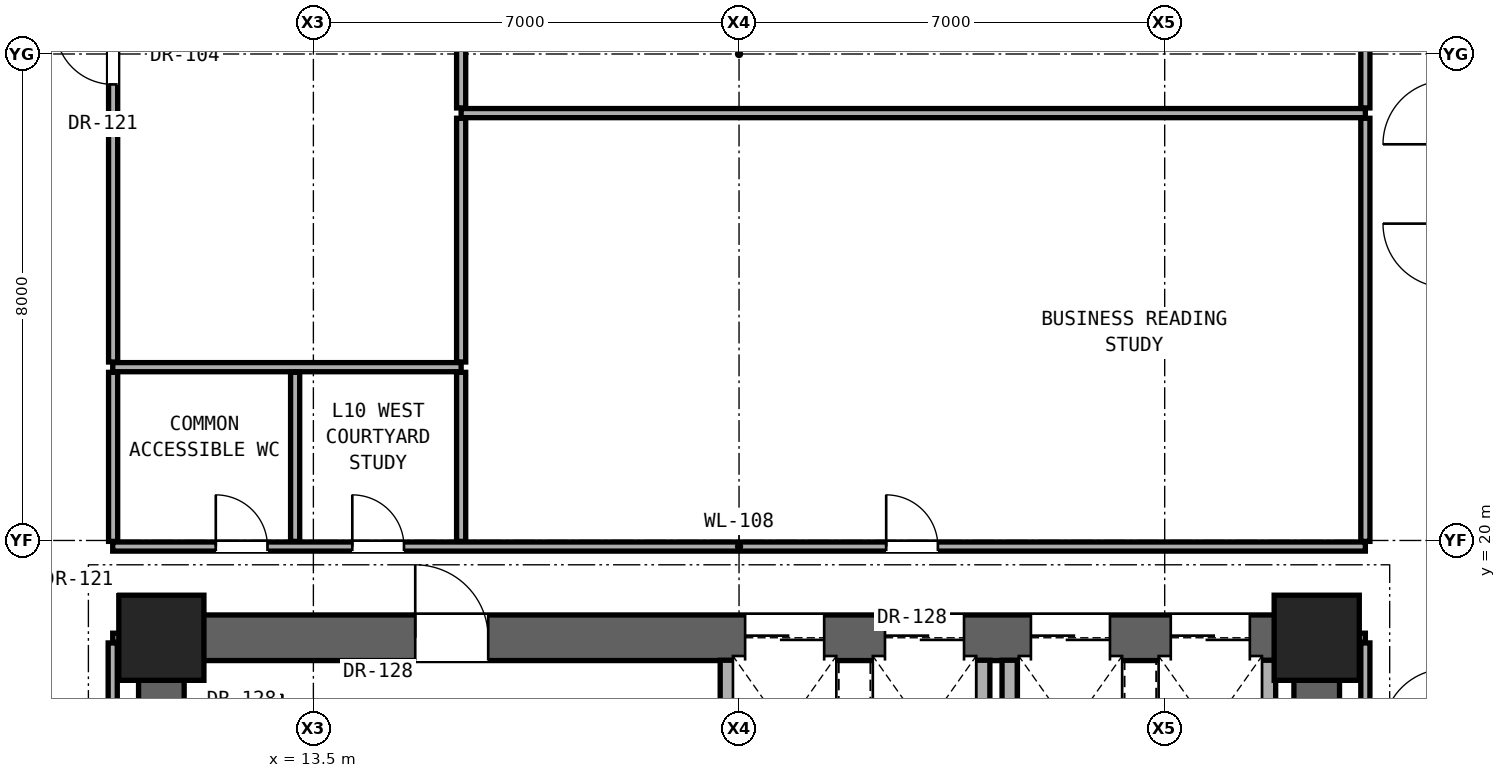
"""IFC4 building model, lengths in metres.
Left out: names, types, materials, properties, quantities, classifications, styles, units other than length and angle.
Written with IfcOpenShell. Run it as: python <this file> out.ifc"""

import sys

from ifc_helpers import new_model, si_unit, direction, frame, frame_2d, origin, origin_2d, place, context, subcontext, project, spatial, rectangle, extrude, element, fill, save


model = new_model("IFC4")
c1 = context("Model", 3, precision=1e-05, world=origin(), true_north=direction((0.0, 1.0)))
c2 = subcontext(c1, "Body", "Model", "MODEL_VIEW")
j1 = project(units=[si_unit("LENGTHUNIT", "METRE"), si_unit("PLANEANGLEUNIT", "RADIAN")], contexts=[c1])
p1 = place(None, origin())
s1 = spatial("IfcSite", under=j1, at=p1, CompositionType="ELEMENT")
p2 = place(p1, origin())
s2 = spatial("IfcBuilding", under=s1, at=p2, CompositionType="ELEMENT")
p3 = place(p2, frame((0.0, 0.0, 38.9)))
s3 = spatial("IfcBuildingStorey", under=s2, at=p3, CompositionType="ELEMENT", Elevation=38.9)
for number, where, z_axis, x_axis in (
    (1, (11.0, 18.4, 0.0), (0.0, 0.0, 1.0), (1.0, 0.0, 0.0)),
    (2, (30.0, 18.4, 0.0), (0.0, 0.0, 1.0), (1.0, 0.0, 0.0)),
):
    element("IfcColumn", number, at=place(p3, frame(where, z_axis=z_axis, x_axis=x_axis)), inside=s3, PredefinedType="COLUMN", context=c2, shape_type="SweptSolid", body=[
        extrude(rectangle(XDim=1.4, YDim=1.4, at=origin_2d()), origin(), (0.0, 0.0, 1.0), 3.3),
    ])
for number, where, z_axis, x_axis in (
    (3, (11.0, 12.4, 0.0), (0.0, 0.0, 1.0), (0.0, 1.0, 0.0)),
    (4, (30.0, 12.4, 0.0), (0.0, 0.0, 1.0), (0.0, 1.0, 0.0)),
):
    element("IfcWall", number, at=place(p3, frame(where, z_axis=z_axis, x_axis=x_axis)), inside=s3, PredefinedType="SHEAR", context=c2, shape_type="SweptSolid", body=[
        extrude(rectangle(XDim=6.0, YDim=0.75, at=frame_2d((3.0, 0.0))), origin(), (0.0, 0.0, 1.0), 3.06),
    ])
p4 = place(p3, frame((11.0, 18.4, 0.0), z_axis=(0.0, 0.0, 1.0), x_axis=(1.0, 0.0, 0.0)))
e5 = element("IfcWall", 5, at=p4, inside=s3, PredefinedType="SHEAR", context=c2, shape_type="SweptSolid", body=[
    extrude(rectangle(XDim=19.0, YDim=0.75, at=frame_2d((9.5, 0.0))), origin(), (0.0, 0.0, 1.0), 3.06),
])
p5 = place(p4, frame((4.175, 0.0, 0.0)))
e6 = element("IfcOpeningElement", 6, at=p5, cuts=e5, PredefinedType="OPENING", context=c2, shape_type="SweptSolid", body=[
    extrude(rectangle(XDim=1.2, YDim=2.25, at=frame_2d((0.6, 1.125))), frame((0.0, 0.385, 0.0), z_axis=(0.0, -1.0, 0.0), x_axis=(1.0, 0.0, 0.0)), (0.0, 0.0, 1.0), 0.77),
])
p6 = place(p4, frame((9.6, 0.0, 0.0)))
e7 = element("IfcOpeningElement", 7, at=p6, cuts=e5, PredefinedType="OPENING", context=c2, shape_type="SweptSolid", body=[
    extrude(rectangle(XDim=1.3, YDim=2.3, at=frame_2d((0.65, 1.15))), frame((0.0, 0.385, 0.0), z_axis=(0.0, -1.0, 0.0), x_axis=(1.0, 0.0, 0.0)), (0.0, 0.0, 1.0), 0.77),
])
p7 = place(p4, frame((11.9, 0.0, 0.0)))
e8 = element("IfcOpeningElement", 8, at=p7, cuts=e5, PredefinedType="OPENING", context=c2, shape_type="SweptSolid", body=[
    extrude(rectangle(XDim=1.3, YDim=2.3, at=frame_2d((0.65, 1.15))), frame((0.0, 0.385, 0.0), z_axis=(0.0, -1.0, 0.0), x_axis=(1.0, 0.0, 0.0)), (0.0, 0.0, 1.0), 0.77),
])
p8 = place(p4, frame((14.3, 0.0, 0.0)))
e9 = element("IfcOpeningElement", 9, at=p8, cuts=e5, PredefinedType="OPENING", context=c2, shape_type="SweptSolid", body=[
    extrude(rectangle(XDim=1.3, YDim=2.3, at=frame_2d((0.65, 1.15))), frame((0.0, 0.385, 0.0), z_axis=(0.0, -1.0, 0.0), x_axis=(1.0, 0.0, 0.0)), (0.0, 0.0, 1.0), 0.77),
])
p9 = place(p4, frame((16.6, 0.0, 0.0)))
e10 = element("IfcOpeningElement", 10, at=p9, cuts=e5, PredefinedType="OPENING", context=c2, shape_type="SweptSolid", body=[
    extrude(rectangle(XDim=1.3, YDim=2.3, at=frame_2d((0.65, 1.15))), frame((0.0, 0.385, 0.0), z_axis=(0.0, -1.0, 0.0), x_axis=(1.0, 0.0, 0.0)), (0.0, 0.0, 1.0), 0.77),
])
for number, where, z_axis, x_axis in (
    (11, (10.2, 18.4, 0.0), (0.0, 0.0, 1.0), (1.0, 0.0, 0.0)),
    (12, (30.37, 18.4, 0.0), (0.0, 0.0, 1.0), (1.0, 0.0, 0.0)),
):
    element("IfcWall", number, at=place(p3, frame(where, z_axis=z_axis, x_axis=x_axis)), inside=s3, PredefinedType="PARTITIONING", context=c2, shape_type="SweptSolid", body=[
        extrude(rectangle(XDim=0.43, YDim=0.15, at=frame_2d((0.215, 0.0))), origin(), (0.0, 0.0, 1.0), 2.436),
    ])
p10 = place(p3, frame((10.2, 19.9, 0.0), z_axis=(0.0, 0.0, 1.0), x_axis=(1.0, 0.0, 0.0)))
e13 = element("IfcWall", 13, at=p10, inside=s3, PredefinedType="PARTITIONING", context=c2, shape_type="SweptSolid", body=[
    extrude(rectangle(XDim=20.6, YDim=0.15, at=frame_2d((10.3, 0.0))), origin(), (0.0, 0.0, 1.0), 2.104),
])
p11 = place(p10, frame((1.695, 0.0, 0.0)))
e14 = element("IfcOpeningElement", 14, at=p11, cuts=e13, PredefinedType="OPENING", context=c2, shape_type="SweptSolid", body=[
    extrude(rectangle(XDim=0.85, YDim=2.01, at=frame_2d((0.425, 1.005))), frame((0.0, 0.085, 0.0), z_axis=(0.0, -1.0, 0.0), x_axis=(1.0, 0.0, 0.0)), (0.0, 0.0, 1.0), 0.17),
])
p12 = place(p10, frame((3.94, 0.0, 0.0)))
e15 = element("IfcOpeningElement", 15, at=p12, cuts=e13, PredefinedType="OPENING", context=c2, shape_type="SweptSolid", body=[
    extrude(rectangle(XDim=0.85, YDim=2.01, at=frame_2d((0.425, 1.005))), frame((0.0, 0.085, 0.0), z_axis=(0.0, -1.0, 0.0), x_axis=(1.0, 0.0, 0.0)), (0.0, 0.0, 1.0), 0.17),
])
p13 = place(p10, frame((12.72, 0.0, 0.0)))
e16 = element("IfcOpeningElement", 16, at=p13, cuts=e13, PredefinedType="OPENING", context=c2, shape_type="SweptSolid", body=[
    extrude(rectangle(XDim=0.85, YDim=2.01, at=frame_2d((0.425, 1.005))), frame((0.0, 0.085, 0.0), z_axis=(0.0, -1.0, 0.0), x_axis=(1.0, 0.0, 0.0)), (0.0, 0.0, 1.0), 0.17),
])
p14 = place(p3, frame((10.2, 22.85, 0.0), z_axis=(0.0, 0.0, 1.0), x_axis=(1.0, 0.0, 0.0)))
e17 = element("IfcWall", 17, at=p14, inside=s3, PredefinedType="PARTITIONING", context=c2, shape_type="SweptSolid", body=[
    extrude(rectangle(XDim=5.73, YDim=0.15, at=frame_2d((2.865, 0.0))), origin(), (0.0, 0.0, 1.0), 2.104),
])
p15 = place(p3, frame((15.93, 27.028, 0.0), z_axis=(0.0, 0.0, 1.0), x_axis=(1.0, 0.0, 0.0)))
e18 = element("IfcWall", 18, at=p15, inside=s3, PredefinedType="PARTITIONING", context=c2, shape_type="SweptSolid", body=[
    extrude(rectangle(XDim=14.87, YDim=0.15, at=frame_2d((7.435, 0.0))), origin(), (0.0, 0.0, 1.0), 2.104),
])
p16 = place(p3, frame((10.2, 12.335, 0.0), z_axis=(0.0, 0.0, 1.0), x_axis=(0.0, 1.0, 0.0)))
e19 = element("IfcWall", 19, at=p16, inside=s3, PredefinedType="PARTITIONING", context=c2, shape_type="SweptSolid", body=[
    extrude(rectangle(XDim=5.98, YDim=0.15, at=frame_2d((2.99, 0.0))), origin(), (0.0, 0.0, 1.0), 2.436),
])
p17 = place(p3, frame((10.207, 19.985, 0.0), z_axis=(0.0, 0.0, 1.0), x_axis=(0.0, 1.0, 0.0)))
e20 = element("IfcWall", 20, at=p17, inside=s3, PredefinedType="PARTITIONING", context=c2, shape_type="SweptSolid", body=[
    extrude(rectangle(XDim=2.78, YDim=0.15, at=frame_2d((1.39, 0.0))), origin(), (0.0, 0.0, 1.0), 3.06),
])
p18 = place(p3, frame((10.207, 22.935, 0.0), z_axis=(0.0, 0.0, 1.0), x_axis=(0.0, 1.0, 0.0)))
e21 = element("IfcWall", 21, at=p18, inside=s3, PredefinedType="PARTITIONING", context=c2, shape_type="SweptSolid", body=[
    extrude(rectangle(XDim=10.08, YDim=0.15, at=frame_2d((5.04, 0.0))), origin(), (0.0, 0.0, 1.0), 2.279),
])
p19 = place(p18, frame((4.565, 0.0, 0.0)))
e22 = element("IfcOpeningElement", 22, at=p19, cuts=e21, PredefinedType="OPENING", context=c2, shape_type="SweptSolid", body=[
    extrude(rectangle(XDim=0.95, YDim=2.15, at=frame_2d((0.475, 1.075))), frame((0.0, 0.085, 0.0), z_axis=(0.0, -1.0, 0.0), x_axis=(1.0, 0.0, 0.0)), (0.0, 0.0, 1.0), 0.17),
])
p20 = place(p3, frame((13.2, 19.985, 0.0), z_axis=(0.0, 0.0, 1.0), x_axis=(0.0, 1.0, 0.0)))
e23 = element("IfcWall", 23, at=p20, inside=s3, PredefinedType="PARTITIONING", context=c2, shape_type="SweptSolid", body=[
    extrude(rectangle(XDim=2.78, YDim=0.15, at=frame_2d((1.39, 0.0))), origin(), (0.0, 0.0, 1.0), 3.06),
])
p21 = place(p3, frame((15.93, 19.985, 0.0), z_axis=(0.0, 0.0, 1.0), x_axis=(0.0, 1.0, 0.0)))
e24 = element("IfcWall", 24, at=p21, inside=s3, PredefinedType="PARTITIONING", context=c2, shape_type="SweptSolid", body=[
    extrude(rectangle(XDim=2.78, YDim=0.15, at=frame_2d((1.39, 0.0))), origin(), (0.0, 0.0, 1.0), 2.589),
])
p22 = place(p3, frame((15.93, 22.935, 0.0), z_axis=(0.0, 0.0, 1.0), x_axis=(0.0, 1.0, 0.0)))
e25 = element("IfcWall", 25, at=p22, inside=s3, PredefinedType="PARTITIONING", context=c2, shape_type="SweptSolid", body=[
    extrude(rectangle(XDim=4.008, YDim=0.15, at=frame_2d((2.004, 0.0))), origin(), (0.0, 0.0, 1.0), 2.104),
])
p23 = place(p3, frame((15.93, 27.113, 0.0), z_axis=(0.0, 0.0, 1.0), x_axis=(0.0, 1.0, 0.0)))
e26 = element("IfcWall", 26, at=p23, inside=s3, PredefinedType="PARTITIONING", context=c2, shape_type="SweptSolid", body=[
    extrude(rectangle(XDim=5.902, YDim=0.15, at=frame_2d((2.951, 0.0))), origin(), (0.0, 0.0, 1.0), 2.104),
])
p24 = place(p3, frame((20.315, 16.555, 0.0), z_axis=(0.0, 0.0, 1.0), x_axis=(0.0, 1.0, 0.0)))
e27 = element("IfcWall", 27, at=p24, inside=s3, PredefinedType="SOLIDWALL", context=c2, shape_type="SweptSolid", body=[
    extrude(rectangle(XDim=1.475, YDim=0.25, at=frame_2d((0.738, 0.0))), origin(), (0.0, 0.0, 1.0), 3.06),
])
for number, where, z_axis, x_axis in (
    (28, (24.5, 15.785, 0.0), (0.0, 0.0, 1.0), (0.0, 1.0, 0.0)),
    (29, (24.95, 15.785, 0.0), (0.0, 0.0, 1.0), (0.0, 1.0, 0.0)),
    (30, (29.2, 15.785, 0.0), (0.0, 0.0, 1.0), (0.0, 1.0, 0.0)),
):
    element("IfcWall", number, at=place(p3, frame(where, z_axis=z_axis, x_axis=x_axis)), inside=s3, PredefinedType="SOLIDWALL", context=c2, shape_type="SweptSolid", body=[
        extrude(rectangle(XDim=2.245, YDim=0.25, at=frame_2d((1.123, 0.0))), origin(), (0.0, 0.0, 1.0), 3.06),
    ])
p25 = place(p3, frame((30.8, 12.335, 0.0), z_axis=(0.0, 0.0, 1.0), x_axis=(0.0, 1.0, 0.0)))
e31 = element("IfcWall", 31, at=p25, inside=s3, PredefinedType="PARTITIONING", context=c2, shape_type="SweptSolid", body=[
    extrude(rectangle(XDim=5.98, YDim=0.15, at=frame_2d((2.99, 0.0))), origin(), (0.0, 0.0, 1.0), 2.436),
])
p26 = place(p3, frame((30.8, 19.985, 0.0), z_axis=(0.0, 0.0, 1.0), x_axis=(0.0, 1.0, 0.0)))
e32 = element("IfcWall", 32, at=p26, inside=s3, PredefinedType="PARTITIONING", context=c2, shape_type="SweptSolid", body=[
    extrude(rectangle(XDim=6.958, YDim=0.15, at=frame_2d((3.479, 0.0))), origin(), (0.0, 0.0, 1.0), 2.279),
])
p27 = place(p3, frame((30.8, 27.113, 0.0), z_axis=(0.0, 0.0, 1.0), x_axis=(0.0, 1.0, 0.0)))
e33 = element("IfcWall", 33, at=p27, inside=s3, PredefinedType="PARTITIONING", context=c2, shape_type="SweptSolid", body=[
    extrude(rectangle(XDim=5.902, YDim=0.15, at=frame_2d((2.951, 0.0))), origin(), (0.0, 0.0, 1.0), 2.279),
])
p28 = place(p5, origin())
e34 = element("IfcDoor", 34, at=p28, inside=s3, OperationType="SINGLE_SWING_LEFT", PredefinedType="DOOR", context=c2, shape_type="SweptSolid", body=[
    extrude(rectangle(XDim=1.2, YDim=2.25, at=frame_2d((0.6, 1.125))), frame((0.0, 0.025, 0.0), z_axis=(0.0, -1.0, 0.0), x_axis=(1.0, 0.0, 0.0)), (0.0, 0.0, 1.0), 0.05),
])
fill(e6, e34)
p29 = place(p11, origin())
e35 = element("IfcDoor", 35, at=p29, inside=s3, OperationType="SINGLE_SWING_LEFT", PredefinedType="DOOR", context=c2, shape_type="SweptSolid", body=[
    extrude(rectangle(XDim=0.85, YDim=2.01, at=frame_2d((0.425, 1.005))), frame((0.0, 0.025, 0.0), z_axis=(0.0, -1.0, 0.0), x_axis=(1.0, 0.0, 0.0)), (0.0, 0.0, 1.0), 0.05),
])
fill(e14, e35)
p30 = place(p12, origin())
e36 = element("IfcDoor", 36, at=p30, inside=s3, OperationType="SINGLE_SWING_LEFT", PredefinedType="DOOR", context=c2, shape_type="SweptSolid", body=[
    extrude(rectangle(XDim=0.85, YDim=2.01, at=frame_2d((0.425, 1.005))), frame((0.0, 0.025, 0.0), z_axis=(0.0, -1.0, 0.0), x_axis=(1.0, 0.0, 0.0)), (0.0, 0.0, 1.0), 0.05),
])
fill(e15, e36)
p31 = place(p19, origin())
e37 = element("IfcDoor", 37, at=p31, inside=s3, OperationType="SINGLE_SWING_RIGHT", PredefinedType="DOOR", context=c2, shape_type="SweptSolid", body=[
    extrude(rectangle(XDim=0.95, YDim=2.15, at=frame_2d((0.475, 1.075))), frame((0.0, 0.025, 0.0), z_axis=(0.0, -1.0, 0.0), x_axis=(1.0, 0.0, 0.0)), (0.0, 0.0, 1.0), 0.05),
])
fill(e22, e37)
p32 = place(p13, origin())
e38 = element("IfcDoor", 38, at=p32, inside=s3, OperationType="SINGLE_SWING_LEFT", PredefinedType="DOOR", context=c2, shape_type="SweptSolid", body=[
    extrude(rectangle(XDim=0.85, YDim=2.01, at=frame_2d((0.425, 1.005))), frame((0.0, 0.025, 0.0), z_axis=(0.0, -1.0, 0.0), x_axis=(1.0, 0.0, 0.0)), (0.0, 0.0, 1.0), 0.05),
])
fill(e16, e38)
p33 = place(p6, origin())
e39 = element("IfcDoor", 39, at=p33, inside=s3, OperationType="DOUBLE_DOOR_SLIDING", PredefinedType="DOOR", context=c2, shape_type="SweptSolid", body=[
    extrude(rectangle(XDim=1.3, YDim=2.3, at=frame_2d((0.65, 1.15))), frame((0.0, 0.025, 0.0), z_axis=(0.0, -1.0, 0.0), x_axis=(1.0, 0.0, 0.0)), (0.0, 0.0, 1.0), 0.05),
])
fill(e7, e39)
p34 = place(p7, origin())
e40 = element("IfcDoor", 40, at=p34, inside=s3, OperationType="DOUBLE_DOOR_SLIDING", PredefinedType="DOOR", context=c2, shape_type="SweptSolid", body=[
    extrude(rectangle(XDim=1.3, YDim=2.3, at=frame_2d((0.65, 1.15))), frame((0.0, 0.025, 0.0), z_axis=(0.0, -1.0, 0.0), x_axis=(1.0, 0.0, 0.0)), (0.0, 0.0, 1.0), 0.05),
])
fill(e8, e40)
p35 = place(p8, origin())
e41 = element("IfcDoor", 41, at=p35, inside=s3, OperationType="DOUBLE_DOOR_SLIDING", PredefinedType="DOOR", context=c2, shape_type="SweptSolid", body=[
    extrude(rectangle(XDim=1.3, YDim=2.3, at=frame_2d((0.65, 1.15))), frame((0.0, 0.025, 0.0), z_axis=(0.0, -1.0, 0.0), x_axis=(1.0, 0.0, 0.0)), (0.0, 0.0, 1.0), 0.05),
])
fill(e9, e41)
p36 = place(p9, origin())
e42 = element("IfcDoor", 42, at=p36, inside=s3, OperationType="DOUBLE_DOOR_SLIDING", PredefinedType="DOOR", context=c2, shape_type="SweptSolid", body=[
    extrude(rectangle(XDim=1.3, YDim=2.3, at=frame_2d((0.65, 1.15))), frame((0.0, 0.025, 0.0), z_axis=(0.0, -1.0, 0.0), x_axis=(1.0, 0.0, 0.0)), (0.0, 0.0, 1.0), 0.05),
])
fill(e10, e42)
save(model, sys.argv[1])
